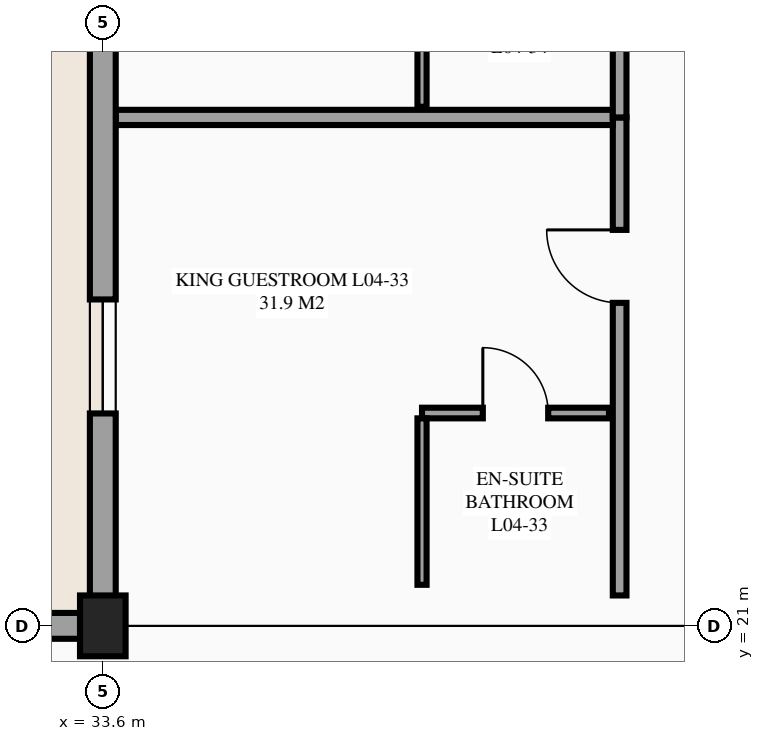
"""IFC4 building model, lengths in metres.
Left out: names, types, materials, properties, quantities, classifications, styles, units other than length and angle.
Written with IfcOpenShell. Run it as: python <this file> out.ifc"""

import sys

from ifc_helpers import new_model, si_unit, direction, frame, frame_2d, origin, origin_2d, place, context, subcontext, project, spatial, rectangle, extrude, element, fill, save


model = new_model("IFC4")
c1 = context("Model", 3, precision=1e-05, world=origin(), true_north=direction((0.0, 1.0)))
c2 = subcontext(c1, "Body", "Model", "MODEL_VIEW")
j1 = project(units=[si_unit("LENGTHUNIT", "METRE"), si_unit("PLANEANGLEUNIT", "RADIAN")], contexts=[c1])
p1 = place(None, origin())
s1 = spatial("IfcSite", under=j1, at=p1, CompositionType="ELEMENT")
p2 = place(p1, origin())
s2 = spatial("IfcBuilding", under=s1, at=p2, CompositionType="ELEMENT")
p3 = place(p2, frame((0.0, 0.0, 18.3)))
s3 = spatial("IfcBuildingStorey", under=s2, at=p3, CompositionType="ELEMENT", Elevation=18.3)
p4 = place(p3, frame((33.6, 21.0, 0.0), z_axis=(0.0, 0.0, 1.0), x_axis=(1.0, 0.0, 0.0)))
e1 = element("IfcColumn", 1, at=p4, inside=s3, PredefinedType="COLUMN", context=c2, shape_type="SweptSolid", body=[
    extrude(rectangle(XDim=0.6, YDim=0.8, at=origin_2d()), origin(), (0.0, 0.0, 1.0), 3.6),
])
p5 = place(p3, frame((33.6, 21.0, 0.0), z_axis=(0.0, 0.0, 1.0), x_axis=(-1.0, 0.0, 0.0)))
e2 = element("IfcWall", 2, at=p5, inside=s3, PredefinedType="STANDARD", context=c2, shape_type="SweptSolid", body=[
    extrude(rectangle(XDim=2.0, YDim=0.34, at=frame_2d((1.0, 0.0))), origin(), (0.0, 0.0, 1.0), 2.53),
])
p6 = place(p3, frame((40.4, 21.4, 0.0), z_axis=(0.0, 0.0, 1.0), x_axis=(0.0, 1.0, 0.0)))
e3 = element("IfcWall", 3, at=p6, inside=s3, PredefinedType="PARTITIONING", context=c2, shape_type="SweptSolid", body=[
    extrude(rectangle(XDim=6.289, YDim=0.18, at=frame_2d((3.145, 0.0))), origin(), (0.0, 0.0, 1.0), 3.375),
])
p7 = place(p6, frame((3.849, 0.0, 0.0)))
e4 = element("IfcOpeningElement", 4, at=p7, cuts=e3, PredefinedType="OPENING", context=c2, shape_type="SweptSolid", body=[
    extrude(rectangle(XDim=0.96, YDim=2.15, at=frame_2d((0.48, 1.075))), frame((0.0, 0.1, 0.0), z_axis=(0.0, -1.0, 0.0), x_axis=(1.0, 0.0, 0.0)), (0.0, 0.0, 1.0), 0.2),
])
p8 = place(p3, frame((33.77, 27.689, 0.0), z_axis=(0.0, 0.0, 1.0), x_axis=(1.0, 0.0, 0.0)))
e5 = element("IfcWall", 5, at=p8, inside=s3, PredefinedType="PARTITIONING", context=c2, shape_type="SweptSolid", body=[
    extrude(rectangle(XDim=6.54, YDim=0.2, at=frame_2d((3.27, 0.0))), origin(), (0.0, 0.0, 1.0), 3.375),
])
p9 = place(p3, frame((37.8, 23.8, 0.0), z_axis=(0.0, 0.0, 1.0), x_axis=(1.0, 0.0, 0.0)))
e6 = element("IfcWall", 6, at=p9, inside=s3, PredefinedType="PARTITIONING", context=c2, shape_type="SweptSolid", body=[
    extrude(rectangle(XDim=2.46, YDim=0.14, at=frame_2d((1.23, 0.0))), origin(), (0.0, 0.0, 1.0), 3.375),
])
p10 = place(p9, frame((0.8, 0.0, 0.0)))
e7 = element("IfcOpeningElement", 7, at=p10, cuts=e6, PredefinedType="OPENING", context=c2, shape_type="SweptSolid", body=[
    extrude(rectangle(XDim=0.86, YDim=2.1, at=frame_2d((0.43, 1.05))), frame((0.0, 0.08, 0.0), z_axis=(0.0, -1.0, 0.0), x_axis=(1.0, 0.0, 0.0)), (0.0, 0.0, 1.0), 0.16),
])
p11 = place(p3, frame((37.8, 21.54, 0.0), z_axis=(0.0, 0.0, 1.0), x_axis=(0.0, 1.0, 0.0)))
e8 = element("IfcWall", 8, at=p11, inside=s3, PredefinedType="PARTITIONING", context=c2, shape_type="SweptSolid", body=[
    extrude(rectangle(XDim=2.19, YDim=0.12, at=frame_2d((1.095, 0.0))), origin(), (0.0, 0.0, 1.0), 3.375),
])
p12 = place(p3, frame((40.4, 27.689, 0.0), z_axis=(0.0, 0.0, 1.0), x_axis=(0.0, 1.0, 0.0)))
e9 = element("IfcWall", 9, at=p12, inside=s3, PredefinedType="PARTITIONING", context=c2, shape_type="SweptSolid", body=[
    extrude(rectangle(XDim=6.289, YDim=0.18, at=frame_2d((3.145, 0.0))), origin(), (0.0, 0.0, 1.0), 3.375),
])
p13 = place(p12, frame((3.849, 0.0, 0.0)))
e10 = element("IfcOpeningElement", 10, at=p13, cuts=e9, PredefinedType="OPENING", context=c2, shape_type="SweptSolid", body=[
    extrude(rectangle(XDim=0.96, YDim=2.15, at=frame_2d((0.48, 1.075))), frame((0.0, 0.1, 0.0), z_axis=(0.0, -1.0, 0.0), x_axis=(1.0, 0.0, 0.0)), (0.0, 0.0, 1.0), 0.2),
])
p14 = place(p3, frame((37.8, 27.829, 0.0), z_axis=(0.0, 0.0, 1.0), x_axis=(0.0, 1.0, 0.0)))
e11 = element("IfcWall", 11, at=p14, inside=s3, PredefinedType="PARTITIONING", context=c2, shape_type="SweptSolid", body=[
    extrude(rectangle(XDim=2.19, YDim=0.12, at=frame_2d((1.095, 0.0))), origin(), (0.0, 0.0, 1.0), 3.375),
])
p15 = place(p3, frame((33.6, 29.4, 0.0), z_axis=(0.0, 0.0, 1.0), x_axis=(0.0, -1.0, 0.0)))
e12 = element("IfcWall", 12, at=p15, inside=s3, PredefinedType="STANDARD", context=c2, shape_type="SweptSolid", body=[
    extrude(rectangle(XDim=8.4, YDim=0.34, at=frame_2d((4.2, 0.0))), origin(), (0.0, 0.0, 1.0), 3.075),
])
p16 = place(p15, frame((4.106, 0.0, 0.85)))
e13 = element("IfcOpeningElement", 13, at=p16, cuts=e12, PredefinedType="OPENING", context=c2, shape_type="SweptSolid", body=[
    extrude(rectangle(XDim=1.5, YDim=1.5, at=frame_2d((0.75, 0.75))), frame((0.0, 0.18, 0.0), z_axis=(0.0, -1.0, 0.0), x_axis=(1.0, 0.0, 0.0)), (0.0, 0.0, 1.0), 0.36),
])
p17 = place(p16, origin())
e14 = element("IfcWindow", 14, at=p17, inside=s3, PartitioningType="SINGLE_PANEL", PredefinedType="WINDOW", context=c2, shape_type="SweptSolid", body=[
    extrude(rectangle(XDim=1.5, YDim=1.5, at=frame_2d((0.75, 0.75))), frame((0.0, 0.03, 0.0), z_axis=(0.0, -1.0, 0.0), x_axis=(1.0, 0.0, 0.0)), (0.0, 0.0, 1.0), 0.06),
])
fill(e13, e14)
p18 = place(p7, origin())
e15 = element("IfcDoor", 15, at=p18, inside=s3, OperationType="SINGLE_SWING_RIGHT", PredefinedType="DOOR", context=c2, shape_type="SweptSolid", body=[
    extrude(rectangle(XDim=0.96, YDim=2.15, at=frame_2d((0.48, 1.075))), frame((0.0, 0.025, 0.0), z_axis=(0.0, -1.0, 0.0), x_axis=(1.0, 0.0, 0.0)), (0.0, 0.0, 1.0), 0.05),
])
fill(e4, e15)
p19 = place(p10, origin())
e16 = element("IfcDoor", 16, at=p19, inside=s3, OperationType="SINGLE_SWING_LEFT", PredefinedType="DOOR", context=c2, shape_type="SweptSolid", body=[
    extrude(rectangle(XDim=0.86, YDim=2.1, at=frame_2d((0.43, 1.05))), frame((0.0, 0.025, 0.0), z_axis=(0.0, -1.0, 0.0), x_axis=(1.0, 0.0, 0.0)), (0.0, 0.0, 1.0), 0.05),
])
fill(e7, e16)
save(model, sys.argv[1])
